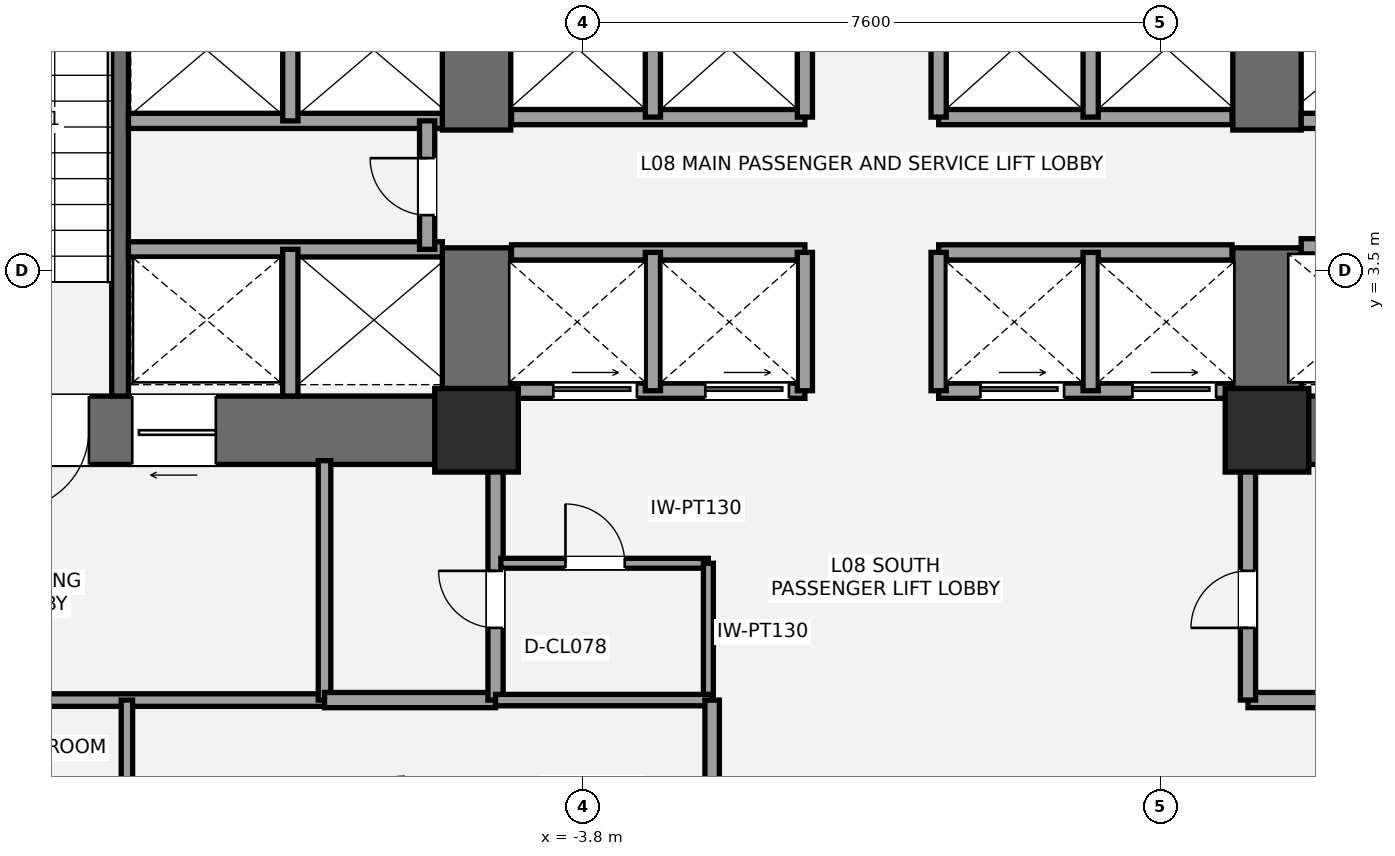
"""IFC4 building model, lengths in metres.
Left out: names, types, materials, properties, quantities, classifications, styles, units other than length and angle.
Written with IfcOpenShell. Run it as: python <this file> out.ifc"""

import sys

from ifc_helpers import new_model, si_unit, direction, frame, frame_2d, origin, origin_2d, place, context, subcontext, project, spatial, rectangle, extrude, element, fill, save


model = new_model("IFC4")
c1 = context("Model", 3, precision=1e-05, world=origin(), true_north=direction((0.0, 1.0)))
c2 = subcontext(c1, "Body", "Model", "MODEL_VIEW")
j1 = project(units=[si_unit("LENGTHUNIT", "METRE"), si_unit("PLANEANGLEUNIT", "RADIAN")], contexts=[c1])
p1 = place(None, origin())
s1 = spatial("IfcSite", under=j1, at=p1, CompositionType="ELEMENT")
p2 = place(p1, origin())
s2 = spatial("IfcBuilding", under=s1, at=p2, CompositionType="ELEMENT")
p3 = place(p2, frame((0.0, 0.0, 34.2)))
s3 = spatial("IfcBuildingStorey", under=s2, at=p3, CompositionType="ELEMENT", Elevation=34.2)
p4 = place(p3, frame((-4.75, 1.4, 0.0), z_axis=(0.0, 0.0, 1.0), x_axis=(-1.0, 0.0, 0.0)))
e1 = element("IfcWall", 1, at=p4, inside=s3, PredefinedType="SHEAR", context=c2, shape_type="SweptSolid", body=[
    extrude(rectangle(XDim=9.3, YDim=0.9, at=frame_2d((4.65, 0.0))), origin(), (0.0, 0.0, 1.0), 3.6),
])
p5 = place(p4, frame((5.55, 0.0, 0.0)))
e2 = element("IfcOpeningElement", 2, at=p5, cuts=e1, PredefinedType="OPENING", context=c2, shape_type="SweptSolid", body=[
    extrude(rectangle(XDim=1.05, YDim=2.15, at=frame_2d((0.525, 1.075))), frame((0.0, 0.46, 0.0), z_axis=(0.0, -1.0, 0.0), x_axis=(1.0, 0.0, 0.0)), (0.0, 0.0, 1.0), 0.92),
])
p6 = place(p4, frame((3.88, 0.0, 0.0)))
e3 = element("IfcOpeningElement", 3, at=p6, cuts=e1, PredefinedType="OPENING", context=c2, shape_type="SweptSolid", body=[
    extrude(rectangle(XDim=1.1, YDim=2.2, at=frame_2d((0.55, 1.1))), frame((0.0, 0.46, 0.0), z_axis=(0.0, -1.0, 0.0), x_axis=(1.0, 0.0, 0.0)), (0.0, 0.0, 1.0), 0.92),
])
p7 = place(p3, frame((-5.2, 0.95, 0.0), z_axis=(0.0, 0.0, 1.0), x_axis=(0.0, 1.0, 0.0)))
e4 = element("IfcWall", 4, at=p7, inside=s3, PredefinedType="SHEAR", context=c2, shape_type="SweptSolid", body=[
    extrude(rectangle(XDim=2.85, YDim=0.9, at=frame_2d((1.425, 0.0))), origin(), (0.0, 0.0, 1.0), 3.6),
])
p8 = place(p3, frame((-5.2, 5.35, 0.0), z_axis=(0.0, 0.0, 1.0), x_axis=(0.0, 1.0, 0.0)))
e5 = element("IfcWall", 5, at=p8, inside=s3, PredefinedType="SHEAR", context=c2, shape_type="SweptSolid", body=[
    extrude(rectangle(XDim=2.0, YDim=0.9, at=frame_2d((1.0, 0.0))), origin(), (0.0, 0.0, 1.0), 3.6),
])
p9 = place(p3, frame((-9.89, 1.85, 0.0), z_axis=(0.0, 0.0, 1.0), x_axis=(0.0, 1.0, 0.0)))
e6 = element("IfcWall", 6, at=p9, inside=s3, PredefinedType="SHEAR", context=c2, shape_type="SweptSolid", body=[
    extrude(rectangle(XDim=7.15, YDim=0.22, at=frame_2d((3.575, 0.0))), origin(), (0.0, 0.0, 1.0), 3.6),
])
p10 = place(p3, frame((14.05, 1.4, 0.0), z_axis=(0.0, 0.0, 1.0), x_axis=(-1.0, 0.0, 0.0)))
e7 = element("IfcWall", 7, at=p10, inside=s3, PredefinedType="SHEAR", context=c2, shape_type="SweptSolid", body=[
    extrude(rectangle(XDim=9.3, YDim=0.9, at=frame_2d((4.65, 0.0))), origin(), (0.0, 0.0, 1.0), 3.6),
])
p11 = place(p10, frame((2.7, 0.0, 0.0)))
e8 = element("IfcOpeningElement", 8, at=p11, cuts=e7, PredefinedType="OPENING", context=c2, shape_type="SweptSolid", body=[
    extrude(rectangle(XDim=1.05, YDim=2.15, at=frame_2d((0.525, 1.075))), frame((0.0, 0.46, 0.0), z_axis=(0.0, -1.0, 0.0), x_axis=(1.0, 0.0, 0.0)), (0.0, 0.0, 1.0), 0.92),
])
p12 = place(p10, frame((4.7, 0.0, 0.0)))
e9 = element("IfcOpeningElement", 9, at=p12, cuts=e7, PredefinedType="OPENING", context=c2, shape_type="SweptSolid", body=[
    extrude(rectangle(XDim=1.1, YDim=2.2, at=frame_2d((0.55, 1.1))), frame((0.0, 0.46, 0.0), z_axis=(0.0, -1.0, 0.0), x_axis=(1.0, 0.0, 0.0)), (0.0, 0.0, 1.0), 0.92),
])
p13 = place(p3, frame((5.2, 0.95, 0.0), z_axis=(0.0, 0.0, 1.0), x_axis=(0.0, 1.0, 0.0)))
e10 = element("IfcWall", 10, at=p13, inside=s3, PredefinedType="SHEAR", context=c2, shape_type="SweptSolid", body=[
    extrude(rectangle(XDim=2.85, YDim=0.9, at=frame_2d((1.425, 0.0))), origin(), (0.0, 0.0, 1.0), 3.6),
])
p14 = place(p3, frame((5.2, 5.35, 0.0), z_axis=(0.0, 0.0, 1.0), x_axis=(0.0, 1.0, 0.0)))
e11 = element("IfcWall", 11, at=p14, inside=s3, PredefinedType="SHEAR", context=c2, shape_type="SweptSolid", body=[
    extrude(rectangle(XDim=2.0, YDim=0.9, at=frame_2d((1.0, 0.0))), origin(), (0.0, 0.0, 1.0), 3.6),
])
for number, where, z_axis, x_axis in (
    (12, (-5.2, 1.4, 0.0), (0.0, 0.0, 1.0), (1.0, 0.0, 0.0)),
    (13, (5.2, 1.4, 0.0), (0.0, 0.0, 1.0), (1.0, 0.0, 0.0)),
):
    element("IfcColumn", number, at=place(p3, frame(where, z_axis=z_axis, x_axis=x_axis)), inside=s3, PredefinedType="COLUMN", context=c2, shape_type="SweptSolid", body=[
        extrude(rectangle(XDim=1.1, YDim=1.1, at=origin_2d()), origin(), (0.0, 0.0, 1.0), 3.6),
    ])
p15 = place(p3, frame((-13.45, -2.15, 0.0), z_axis=(0.0, 0.0, 1.0), x_axis=(1.0, 0.0, 0.0)))
e14 = element("IfcWall", 14, at=p15, inside=s3, PredefinedType="PARTITIONING", context=c2, shape_type="SweptSolid", body=[
    extrude(rectangle(XDim=6.25, YDim=0.165, at=frame_2d((3.125, 0.0))), origin(), (0.0, 0.0, 1.0), 3.4),
])
p16 = place(p3, frame((-7.2, -2.15, 0.0), z_axis=(0.0, 0.0, 1.0), x_axis=(0.0, 1.0, 0.0)))
e15 = element("IfcWall", 15, at=p16, inside=s3, PredefinedType="PARTITIONING", context=c2, shape_type="SweptSolid", body=[
    extrude(rectangle(XDim=3.15, YDim=0.165, at=frame_2d((1.575, 0.0))), origin(), (0.0, 0.0, 1.0), 3.4),
])
p17 = place(p3, frame((-7.2, -2.15, 0.0), z_axis=(0.0, 0.0, 1.0), x_axis=(1.0, 0.0, 0.0)))
e16 = element("IfcWall", 16, at=p17, inside=s3, PredefinedType="SOLIDWALL", context=c2, shape_type="SweptSolid", body=[
    extrude(rectangle(XDim=2.25, YDim=0.2, at=frame_2d((1.125, 0.0))), origin(), (0.0, 0.0, 1.0), 3.4),
])
p18 = place(p3, frame((-4.95, -2.15, 0.0), z_axis=(0.0, 0.0, 1.0), x_axis=(0.0, 1.0, 0.0)))
e17 = element("IfcWall", 17, at=p18, inside=s3, PredefinedType="SOLIDWALL", context=c2, shape_type="SweptSolid", body=[
    extrude(rectangle(XDim=3.15, YDim=0.2, at=frame_2d((1.575, 0.0))), origin(), (0.0, 0.0, 1.0), 2.853),
])
p19 = place(p18, frame((0.95, 0.0, 0.0)))
e18 = element("IfcOpeningElement", 18, at=p19, cuts=e17, PredefinedType="OPENING", context=c2, shape_type="SweptSolid", body=[
    extrude(rectangle(XDim=0.75, YDim=2.1, at=frame_2d((0.375, 1.05))), frame((0.0, 0.11, 0.0), z_axis=(0.0, -1.0, 0.0), x_axis=(1.0, 0.0, 0.0)), (0.0, 0.0, 1.0), 0.22),
])
p20 = place(p3, frame((4.95, -2.15, 0.0), z_axis=(0.0, 0.0, 1.0), x_axis=(1.0, 0.0, 0.0)))
e19 = element("IfcWall", 19, at=p20, inside=s3, PredefinedType="SOLIDWALL", context=c2, shape_type="SweptSolid", body=[
    extrude(rectangle(XDim=2.25, YDim=0.2, at=frame_2d((1.125, 0.0))), origin(), (0.0, 0.0, 1.0), 3.4),
])
p21 = place(p3, frame((4.95, -2.15, 0.0), z_axis=(0.0, 0.0, 1.0), x_axis=(0.0, 1.0, 0.0)))
e20 = element("IfcWall", 20, at=p21, inside=s3, PredefinedType="SOLIDWALL", context=c2, shape_type="SweptSolid", body=[
    extrude(rectangle(XDim=3.15, YDim=0.2, at=frame_2d((1.575, 0.0))), origin(), (0.0, 0.0, 1.0), 2.853),
])
p22 = place(p21, frame((0.95, 0.0, 0.0)))
e21 = element("IfcOpeningElement", 21, at=p22, cuts=e20, PredefinedType="OPENING", context=c2, shape_type="SweptSolid", body=[
    extrude(rectangle(XDim=0.75, YDim=2.1, at=frame_2d((0.375, 1.05))), frame((0.0, 0.11, 0.0), z_axis=(0.0, -1.0, 0.0), x_axis=(1.0, 0.0, 0.0)), (0.0, 0.0, 1.0), 0.22),
])
p23 = place(p3, frame((-4.88, -0.35, 0.0), z_axis=(0.0, 0.0, 1.0), x_axis=(1.0, 0.0, 0.0)))
e22 = element("IfcWall", 22, at=p23, inside=s3, PredefinedType="PARTITIONING", context=c2, shape_type="SweptSolid", body=[
    extrude(rectangle(XDim=2.73, YDim=0.13, at=frame_2d((1.365, 0.0))), origin(), (0.0, 0.0, 1.0), 2.853),
])
p24 = place(p23, frame((0.85, 0.0, 0.0)))
e23 = element("IfcOpeningElement", 23, at=p24, cuts=e22, PredefinedType="OPENING", context=c2, shape_type="SweptSolid", body=[
    extrude(rectangle(XDim=0.78, YDim=2.1, at=frame_2d((0.39, 1.05))), frame((0.0, 0.075, 0.0), z_axis=(0.0, -1.0, 0.0), x_axis=(1.0, 0.0, 0.0)), (0.0, 0.0, 1.0), 0.15),
])
p25 = place(p3, frame((-2.15, -2.15, 0.0), z_axis=(0.0, 0.0, 1.0), x_axis=(0.0, 1.0, 0.0)))
e24 = element("IfcWall", 24, at=p25, inside=s3, PredefinedType="PARTITIONING", context=c2, shape_type="SweptSolid", body=[
    extrude(rectangle(XDim=1.8, YDim=0.13, at=frame_2d((0.9, 0.0))), origin(), (0.0, 0.0, 1.0), 3.4),
])
p26 = place(p3, frame((-9.78, 3.78, 0.0), z_axis=(0.0, 0.0, 1.0), x_axis=(1.0, 0.0, 0.0)))
e25 = element("IfcWall", 25, at=p26, inside=s3, PredefinedType="SOLIDWALL", context=c2, shape_type="SweptSolid", body=[
    extrude(rectangle(XDim=4.13, YDim=0.2, at=frame_2d((2.065, 0.0))), origin(), (0.0, 0.0, 1.0), 3.4),
])
p27 = place(p3, frame((-7.65, 1.85, 0.0), z_axis=(0.0, 0.0, 1.0), x_axis=(0.0, 1.0, 0.0)))
e26 = element("IfcWall", 26, at=p27, inside=s3, PredefinedType="SOLIDWALL", context=c2, shape_type="SweptSolid", body=[
    extrude(rectangle(XDim=1.93, YDim=0.2, at=frame_2d((0.965, 0.0))), origin(), (0.0, 0.0, 1.0), 3.4),
])
p28 = place(p3, frame((-9.78, 5.47, 0.0), z_axis=(0.0, 0.0, 1.0), x_axis=(1.0, 0.0, 0.0)))
e27 = element("IfcWall", 27, at=p28, inside=s3, PredefinedType="SOLIDWALL", context=c2, shape_type="SweptSolid", body=[
    extrude(rectangle(XDim=4.13, YDim=0.2, at=frame_2d((2.065, 0.0))), origin(), (0.0, 0.0, 1.0), 3.4),
])
p29 = place(p3, frame((-7.65, 5.47, 0.0), z_axis=(0.0, 0.0, 1.0), x_axis=(0.0, 1.0, 0.0)))
e28 = element("IfcWall", 28, at=p29, inside=s3, PredefinedType="SOLIDWALL", context=c2, shape_type="SweptSolid", body=[
    extrude(rectangle(XDim=1.86, YDim=0.2, at=frame_2d((0.93, 0.0))), origin(), (0.0, 0.0, 1.0), 3.4),
])
p30 = place(p3, frame((-5.85, 3.78, 0.0), z_axis=(0.0, 0.0, 1.0), x_axis=(0.0, 1.0, 0.0)))
e29 = element("IfcWall", 29, at=p30, inside=s3, PredefinedType="SOLIDWALL", context=c2, shape_type="SweptSolid", body=[
    extrude(rectangle(XDim=1.69, YDim=0.2, at=frame_2d((0.845, 0.0))), origin(), (0.0, 0.0, 1.0), 3.4),
])
p31 = place(p30, frame((0.45, 0.0, 0.0)))
e30 = element("IfcOpeningElement", 30, at=p31, cuts=e29, PredefinedType="OPENING", context=c2, shape_type="SweptSolid", body=[
    extrude(rectangle(XDim=0.75, YDim=2.1, at=frame_2d((0.375, 1.05))), frame((0.0, 0.11, 0.0), z_axis=(0.0, -1.0, 0.0), x_axis=(1.0, 0.0, 0.0)), (0.0, 0.0, 1.0), 0.22),
])
p32 = place(p3, frame((5.65, 3.82, 0.0), z_axis=(0.0, 0.0, 1.0), x_axis=(1.0, 0.0, 0.0)))
e31 = element("IfcWall", 31, at=p32, inside=s3, PredefinedType="SOLIDWALL", context=c2, shape_type="SweptSolid", body=[
    extrude(rectangle(XDim=4.13, YDim=0.2, at=frame_2d((2.065, 0.0))), origin(), (0.0, 0.0, 1.0), 3.4),
])
p33 = place(p32, frame((0.65, 0.0, 0.0)))
e32 = element("IfcOpeningElement", 32, at=p33, cuts=e31, PredefinedType="OPENING", context=c2, shape_type="SweptSolid", body=[
    extrude(rectangle(XDim=1.2, YDim=2.2, at=frame_2d((0.6, 1.1))), frame((0.0, 0.11, 0.0), z_axis=(0.0, -1.0, 0.0), x_axis=(1.0, 0.0, 0.0)), (0.0, 0.0, 1.0), 0.22),
])
p34 = place(p3, frame((5.65, 5.47, 0.0), z_axis=(0.0, 0.0, 1.0), x_axis=(1.0, 0.0, 0.0)))
e33 = element("IfcWall", 33, at=p34, inside=s3, PredefinedType="SOLIDWALL", context=c2, shape_type="SweptSolid", body=[
    extrude(rectangle(XDim=4.13, YDim=0.2, at=frame_2d((2.065, 0.0))), origin(), (0.0, 0.0, 1.0), 3.4),
])
p35 = place(p3, frame((-4.74, 1.92, 0.0), z_axis=(0.0, 0.0, 1.0), x_axis=(1.0, 0.0, 0.0)))
e34 = element("IfcWall", 34, at=p35, inside=s3, PredefinedType="SOLIDWALL", context=c2, shape_type="SweptSolid", body=[
    extrude(rectangle(XDim=3.86, YDim=0.2, at=frame_2d((1.93, 0.0))), origin(), (0.0, 0.0, 1.0), 2.39),
])
p36 = place(p35, frame((0.55, 0.0, 0.0)))
e35 = element("IfcOpeningElement", 35, at=p36, cuts=e34, PredefinedType="OPENING", context=c2, shape_type="SweptSolid", body=[
    extrude(rectangle(XDim=1.1, YDim=2.2, at=frame_2d((0.55, 1.1))), frame((0.0, 0.11, 0.0), z_axis=(0.0, -1.0, 0.0), x_axis=(1.0, 0.0, 0.0)), (0.0, 0.0, 1.0), 0.22),
])
p37 = place(p35, frame((2.55, 0.0, 0.0)))
e36 = element("IfcOpeningElement", 36, at=p37, cuts=e34, PredefinedType="OPENING", context=c2, shape_type="SweptSolid", body=[
    extrude(rectangle(XDim=1.1, YDim=2.2, at=frame_2d((0.55, 1.1))), frame((0.0, 0.11, 0.0), z_axis=(0.0, -1.0, 0.0), x_axis=(1.0, 0.0, 0.0)), (0.0, 0.0, 1.0), 0.22),
])
p38 = place(p3, frame((0.88, 1.92, 0.0), z_axis=(0.0, 0.0, 1.0), x_axis=(1.0, 0.0, 0.0)))
e37 = element("IfcWall", 37, at=p38, inside=s3, PredefinedType="SOLIDWALL", context=c2, shape_type="SweptSolid", body=[
    extrude(rectangle(XDim=3.86, YDim=0.2, at=frame_2d((1.93, 0.0))), origin(), (0.0, 0.0, 1.0), 2.39),
])
p39 = place(p38, frame((0.55, 0.0, 0.0)))
e38 = element("IfcOpeningElement", 38, at=p39, cuts=e37, PredefinedType="OPENING", context=c2, shape_type="SweptSolid", body=[
    extrude(rectangle(XDim=1.1, YDim=2.2, at=frame_2d((0.55, 1.1))), frame((0.0, 0.11, 0.0), z_axis=(0.0, -1.0, 0.0), x_axis=(1.0, 0.0, 0.0)), (0.0, 0.0, 1.0), 0.22),
])
p40 = place(p38, frame((2.55, 0.0, 0.0)))
e39 = element("IfcOpeningElement", 39, at=p40, cuts=e37, PredefinedType="OPENING", context=c2, shape_type="SweptSolid", body=[
    extrude(rectangle(XDim=1.1, YDim=2.2, at=frame_2d((0.55, 1.1))), frame((0.0, 0.11, 0.0), z_axis=(0.0, -1.0, 0.0), x_axis=(1.0, 0.0, 0.0)), (0.0, 0.0, 1.0), 0.22),
])
for number, where, z_axis, x_axis in (
    (40, (-4.74, 3.74, 0.0), (0.0, 0.0, 1.0), (1.0, 0.0, 0.0)),
    (41, (0.88, 3.74, 0.0), (0.0, 0.0, 1.0), (1.0, 0.0, 0.0)),
):
    element("IfcWall", number, at=place(p3, frame(where, z_axis=z_axis, x_axis=x_axis)), inside=s3, PredefinedType="SOLIDWALL", context=c2, shape_type="SweptSolid", body=[
        extrude(rectangle(XDim=3.86, YDim=0.2, at=frame_2d((1.93, 0.0))), origin(), (0.0, 0.0, 1.0), 3.4),
    ])
for number, where, z_axis, x_axis in (
    (42, (-2.88, 1.92, 0.0), (0.0, 0.0, 1.0), (0.0, 1.0, 0.0)),
    (43, (2.88, 1.92, 0.0), (0.0, 0.0, 1.0), (0.0, 1.0, 0.0)),
    (44, (-0.88, 1.92, 0.0), (0.0, 0.0, 1.0), (0.0, 1.0, 0.0)),
    (45, (0.88, 1.92, 0.0), (0.0, 0.0, 1.0), (0.0, 1.0, 0.0)),
):
    element("IfcWall", number, at=place(p3, frame(where, z_axis=z_axis, x_axis=x_axis)), inside=s3, PredefinedType="SOLIDWALL", context=c2, shape_type="SweptSolid", body=[
        extrude(rectangle(XDim=1.82, YDim=0.2, at=frame_2d((0.91, 0.0))), origin(), (0.0, 0.0, 1.0), 3.4),
    ])
for number, where, z_axis, x_axis in (
    (46, (-4.74, 5.52, 0.0), (0.0, 0.0, 1.0), (1.0, 0.0, 0.0)),
    (47, (0.88, 5.52, 0.0), (0.0, 0.0, 1.0), (1.0, 0.0, 0.0)),
):
    element("IfcWall", number, at=place(p3, frame(where, z_axis=z_axis, x_axis=x_axis)), inside=s3, PredefinedType="SOLIDWALL", context=c2, shape_type="SweptSolid", body=[
        extrude(rectangle(XDim=3.86, YDim=0.2, at=frame_2d((1.93, 0.0))), origin(), (0.0, 0.0, 1.0), 3.4),
    ])
for number, where, z_axis, x_axis in (
    (48, (-2.88, 5.52, 0.0), (0.0, 0.0, 1.0), (0.0, 1.0, 0.0)),
    (49, (2.88, 5.52, 0.0), (0.0, 0.0, 1.0), (0.0, 1.0, 0.0)),
    (50, (-0.88, 5.52, 0.0), (0.0, 0.0, 1.0), (0.0, 1.0, 0.0)),
    (51, (0.88, 5.52, 0.0), (0.0, 0.0, 1.0), (0.0, 1.0, 0.0)),
):
    element("IfcWall", number, at=place(p3, frame(where, z_axis=z_axis, x_axis=x_axis)), inside=s3, PredefinedType="SOLIDWALL", context=c2, shape_type="SweptSolid", body=[
        extrude(rectangle(XDim=1.81, YDim=0.2, at=frame_2d((0.905, 0.0))), origin(), (0.0, 0.0, 1.0), 3.4),
    ])
p41 = place(p3, frame((-4.95, -2.15, 0.0), z_axis=(0.0, 0.0, 1.0), x_axis=(1.0, 0.0, 0.0)))
e52 = element("IfcWall", 52, at=p41, inside=s3, PredefinedType="PLUMBINGWALL", context=c2, shape_type="SweptSolid", body=[
    extrude(rectangle(XDim=2.85, YDim=0.15, at=frame_2d((1.425, 0.0))), origin(), (0.0, 0.0, 1.0), 3.4),
])
p42 = place(p3, frame((-2.1, -4.05, 0.0), z_axis=(0.0, 0.0, 1.0), x_axis=(0.0, 1.0, 0.0)))
e53 = element("IfcWall", 53, at=p42, inside=s3, PredefinedType="PLUMBINGWALL", context=c2, shape_type="SweptSolid", body=[
    extrude(rectangle(XDim=1.9, YDim=0.19, at=frame_2d((0.95, 0.0))), origin(), (0.0, 0.0, 1.0), 2.853),
])
p43 = place(p3, frame((-9.8, -4.05, 0.0), z_axis=(0.0, 0.0, 1.0), x_axis=(0.0, 1.0, 0.0)))
e54 = element("IfcWall", 54, at=p43, inside=s3, PredefinedType="PLUMBINGWALL", context=c2, shape_type="SweptSolid", body=[
    extrude(rectangle(XDim=1.9, YDim=0.15, at=frame_2d((0.95, 0.0))), origin(), (0.0, 0.0, 1.0), 3.4),
])
p44 = place(p5, origin())
e55 = element("IfcDoor", 55, at=p44, inside=s3, OperationType="SINGLE_SWING_RIGHT", PredefinedType="DOOR", context=c2, shape_type="SweptSolid", body=[
    extrude(rectangle(XDim=1.05, YDim=2.15, at=frame_2d((0.525, 1.075))), frame((0.0, 0.025, 0.0), z_axis=(0.0, -1.0, 0.0), x_axis=(1.0, 0.0, 0.0)), (0.0, 0.0, 1.0), 0.05),
])
fill(e2, e55)
p45 = place(p19, origin())
e56 = element("IfcDoor", 56, at=p45, inside=s3, OperationType="SINGLE_SWING_RIGHT", PredefinedType="DOOR", context=c2, shape_type="SweptSolid", body=[
    extrude(rectangle(XDim=0.75, YDim=2.1, at=frame_2d((0.375, 1.05))), frame((0.0, 0.025, 0.0), z_axis=(0.0, -1.0, 0.0), x_axis=(1.0, 0.0, 0.0)), (0.0, 0.0, 1.0), 0.05),
])
fill(e18, e56)
p46 = place(p22, origin())
e57 = element("IfcDoor", 57, at=p46, inside=s3, OperationType="SINGLE_SWING_LEFT", PredefinedType="DOOR", context=c2, shape_type="SweptSolid", body=[
    extrude(rectangle(XDim=0.75, YDim=2.1, at=frame_2d((0.375, 1.05))), frame((0.0, 0.025, 0.0), z_axis=(0.0, -1.0, 0.0), x_axis=(1.0, 0.0, 0.0)), (0.0, 0.0, 1.0), 0.05),
])
fill(e21, e57)
p47 = place(p24, origin())
e58 = element("IfcDoor", 58, at=p47, inside=s3, OperationType="SINGLE_SWING_LEFT", PredefinedType="DOOR", context=c2, shape_type="SweptSolid", body=[
    extrude(rectangle(XDim=0.78, YDim=2.1, at=frame_2d((0.39, 1.05))), frame((0.0, 0.025, 0.0), z_axis=(0.0, -1.0, 0.0), x_axis=(1.0, 0.0, 0.0)), (0.0, 0.0, 1.0), 0.05),
])
fill(e23, e58)
p48 = place(p6, origin())
e59 = element("IfcDoor", 59, at=p48, inside=s3, OperationType="SLIDING_TO_LEFT", PredefinedType="DOOR", context=c2, shape_type="SweptSolid", body=[
    extrude(rectangle(XDim=1.1, YDim=2.2, at=frame_2d((0.55, 1.1))), frame((0.0, 0.025, 0.0), z_axis=(0.0, -1.0, 0.0), x_axis=(1.0, 0.0, 0.0)), (0.0, 0.0, 1.0), 0.05),
])
fill(e3, e59)
p49 = place(p31, origin())
e60 = element("IfcDoor", 60, at=p49, inside=s3, OperationType="SINGLE_SWING_RIGHT", PredefinedType="DOOR", context=c2, shape_type="SweptSolid", body=[
    extrude(rectangle(XDim=0.75, YDim=2.1, at=frame_2d((0.375, 1.05))), frame((0.0, 0.025, 0.0), z_axis=(0.0, -1.0, 0.0), x_axis=(1.0, 0.0, 0.0)), (0.0, 0.0, 1.0), 0.05),
])
fill(e30, e60)
p50 = place(p36, origin())
e61 = element("IfcDoor", 61, at=p50, inside=s3, OperationType="SLIDING_TO_LEFT", PredefinedType="DOOR", context=c2, shape_type="SweptSolid", body=[
    extrude(rectangle(XDim=1.1, YDim=2.2, at=frame_2d((0.55, 1.1))), frame((0.0, 0.025, 0.0), z_axis=(0.0, -1.0, 0.0), x_axis=(1.0, 0.0, 0.0)), (0.0, 0.0, 1.0), 0.05),
])
fill(e35, e61)
p51 = place(p37, origin())
e62 = element("IfcDoor", 62, at=p51, inside=s3, OperationType="SLIDING_TO_LEFT", PredefinedType="DOOR", context=c2, shape_type="SweptSolid", body=[
    extrude(rectangle(XDim=1.1, YDim=2.2, at=frame_2d((0.55, 1.1))), frame((0.0, 0.025, 0.0), z_axis=(0.0, -1.0, 0.0), x_axis=(1.0, 0.0, 0.0)), (0.0, 0.0, 1.0), 0.05),
])
fill(e36, e62)
p52 = place(p39, origin())
e63 = element("IfcDoor", 63, at=p52, inside=s3, OperationType="SLIDING_TO_LEFT", PredefinedType="DOOR", context=c2, shape_type="SweptSolid", body=[
    extrude(rectangle(XDim=1.1, YDim=2.2, at=frame_2d((0.55, 1.1))), frame((0.0, 0.025, 0.0), z_axis=(0.0, -1.0, 0.0), x_axis=(1.0, 0.0, 0.0)), (0.0, 0.0, 1.0), 0.05),
])
fill(e38, e63)
p53 = place(p40, origin())
e64 = element("IfcDoor", 64, at=p53, inside=s3, OperationType="SLIDING_TO_LEFT", PredefinedType="DOOR", context=c2, shape_type="SweptSolid", body=[
    extrude(rectangle(XDim=1.1, YDim=2.2, at=frame_2d((0.55, 1.1))), frame((0.0, 0.025, 0.0), z_axis=(0.0, -1.0, 0.0), x_axis=(1.0, 0.0, 0.0)), (0.0, 0.0, 1.0), 0.05),
])
fill(e39, e64)
save(model, sys.argv[1])
